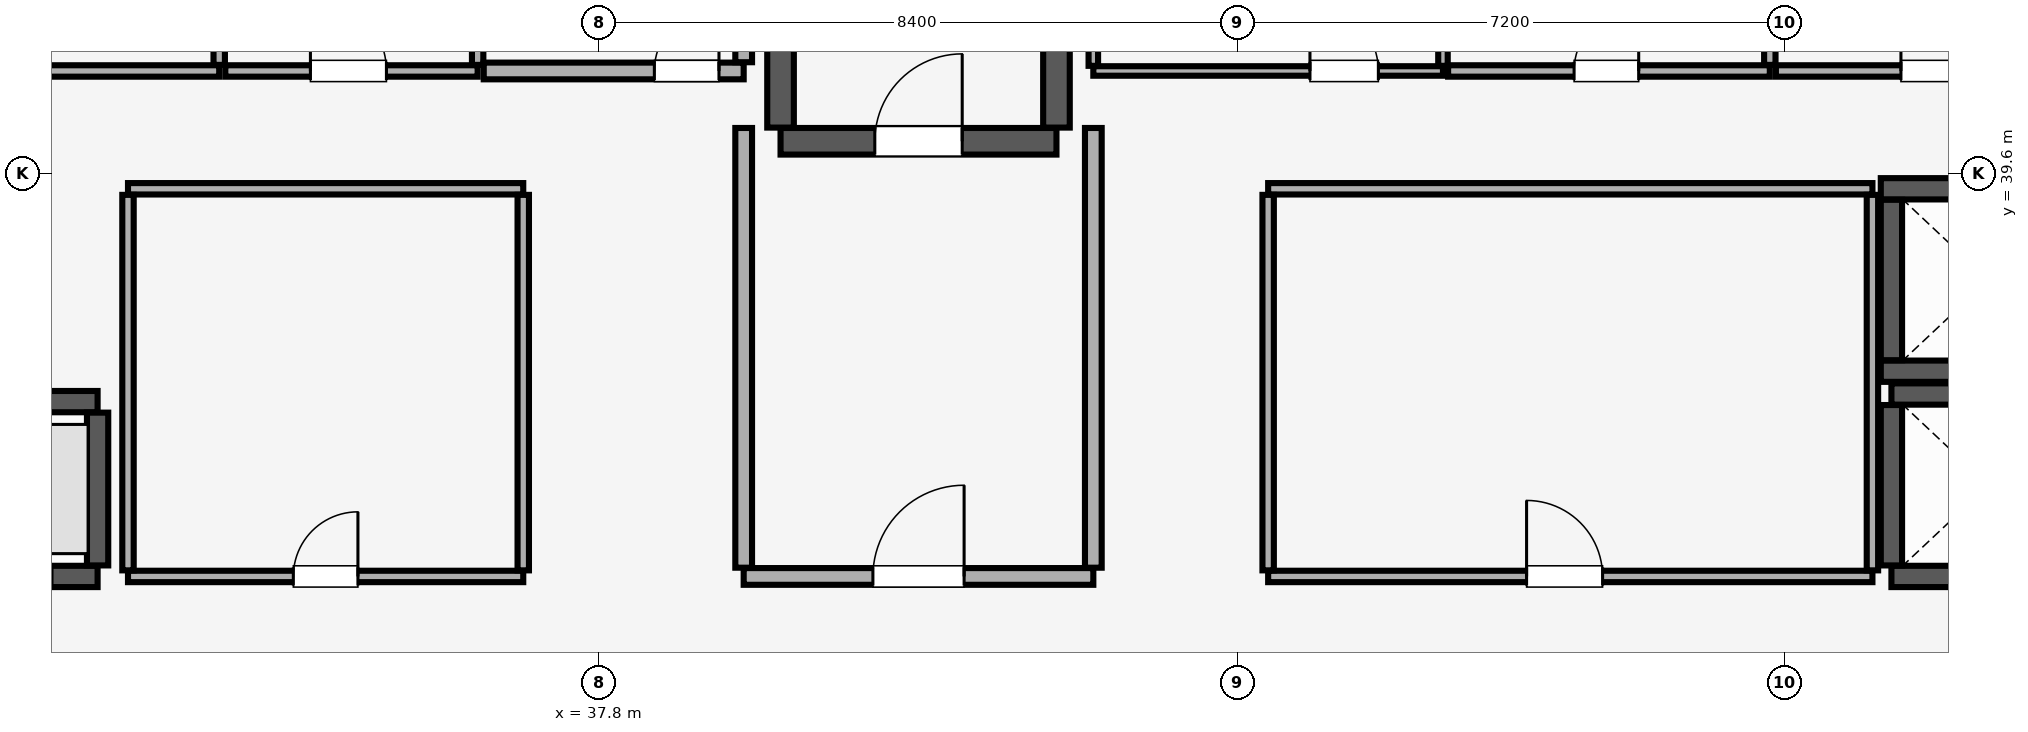
"""IFC4 building model, lengths in metres.
Left out: names, types, materials, properties, quantities, classifications, styles, units other than length and angle.
Written with IfcOpenShell. Run it as: python <this file> out.ifc"""

import sys

from ifc_helpers import new_model, si_unit, direction, frame, frame_2d, origin, place, context, subcontext, project, spatial, rectangle, extrude, element, fill, save


model = new_model("IFC4")
c1 = context("Model", 3, precision=1e-05, world=origin(), true_north=direction((0.0, 1.0)))
c2 = subcontext(c1, "Body", "Model", "MODEL_VIEW")
j1 = project(units=[si_unit("LENGTHUNIT", "METRE"), si_unit("PLANEANGLEUNIT", "RADIAN")], contexts=[c1])
p1 = place(None, origin())
s1 = spatial("IfcSite", under=j1, at=p1, CompositionType="ELEMENT")
p2 = place(p1, origin())
s2 = spatial("IfcBuilding", under=s1, at=p2, CompositionType="ELEMENT")
p3 = place(p2, frame((0.0, 0.0, 290.3)))
s3 = spatial("IfcBuildingStorey", under=s2, at=p3, CompositionType="ELEMENT", Elevation=290.3)
p4 = place(p3, frame((40.185, 40.025, 0.0), z_axis=(0.0, 0.0, 1.0), x_axis=(1.0, 0.0, 0.0)))
e1 = element("IfcWall", 1, at=p4, inside=s3, PredefinedType="SHEAR", context=c2, shape_type="SweptSolid", body=[
    extrude(rectangle(XDim=3.63, YDim=0.35, at=frame_2d((1.815, 0.0))), origin(), (0.0, 0.0, 1.0), 4.02),
])
p5 = place(p4, frame((1.24, 0.0, 0.0)))
e2 = element("IfcOpeningElement", 2, at=p5, cuts=e1, PredefinedType="OPENING", context=c2, shape_type="SweptSolid", body=[
    extrude(rectangle(XDim=1.15, YDim=2.15, at=frame_2d((0.575, 1.075))), frame((0.0, 0.185, 0.0), z_axis=(0.0, -1.0, 0.0), x_axis=(1.0, 0.0, 0.0)), (0.0, 0.0, 1.0), 0.37),
])
for number, where, z_axis, x_axis in (
    (3, (40.185, 40.205, 0.0), (0.0, 0.0, 1.0), (0.0, 1.0, 0.0)),
    (4, (43.815, 40.205, 0.0), (0.0, 0.0, 1.0), (0.0, 1.0, 0.0)),
):
    element("IfcWall", number, at=place(p3, frame(where, z_axis=z_axis, x_axis=x_axis)), inside=s3, PredefinedType="SHEAR", context=c2, shape_type="SweptSolid", body=[
        extrude(rectangle(XDim=8.09, YDim=0.35, at=frame_2d((4.045, 0.0))), origin(), (0.0, 0.0, 1.0), 4.02),
    ])
p6 = place(p3, frame((28.9, 34.3, 0.0), z_axis=(0.0, 0.0, 1.0), x_axis=(1.0, 0.0, 0.0)))
e5 = element("IfcWall", 5, at=p6, inside=s3, PredefinedType="SHEAR", context=c2, shape_type="SweptSolid", body=[
    extrude(rectangle(XDim=2.3, YDim=0.28, at=frame_2d((1.15, 0.0))), origin(), (0.0, 0.0, 1.0), 4.02),
])
p7 = place(p6, frame((0.6, 0.0, 0.0)))
e6 = element("IfcOpeningElement", 6, at=p7, cuts=e5, PredefinedType="OPENING", context=c2, shape_type="SweptSolid", body=[
    extrude(rectangle(XDim=1.1, YDim=2.2, at=frame_2d((0.55, 1.1))), frame((0.0, 0.15, 0.0), z_axis=(0.0, -1.0, 0.0), x_axis=(1.0, 0.0, 0.0)), (0.0, 0.0, 1.0), 0.3),
])
p8 = place(p3, frame((28.9, 36.6, 0.0), z_axis=(0.0, 0.0, 1.0), x_axis=(1.0, 0.0, 0.0)))
e7 = element("IfcWall", 7, at=p8, inside=s3, PredefinedType="SHEAR", context=c2, shape_type="SweptSolid", body=[
    extrude(rectangle(XDim=2.3, YDim=0.28, at=frame_2d((1.15, 0.0))), origin(), (0.0, 0.0, 1.0), 4.02),
])
p9 = place(p3, frame((31.2, 34.445, 0.0), z_axis=(0.0, 0.0, 1.0), x_axis=(0.0, 1.0, 0.0)))
e8 = element("IfcWall", 8, at=p9, inside=s3, PredefinedType="SHEAR", context=c2, shape_type="SweptSolid", body=[
    extrude(rectangle(XDim=2.01, YDim=0.28, at=frame_2d((1.005, 0.0))), origin(), (0.0, 0.0, 1.0), 4.02),
])
for number, where, z_axis, x_axis in (
    (9, (54.8, 34.3, 0.0), (0.0, 0.0, 1.0), (1.0, 0.0, 0.0)),
    (10, (54.8, 36.7, 0.0), (0.0, 0.0, 1.0), (1.0, 0.0, 0.0)),
):
    element("IfcWall", number, at=place(p3, frame(where, z_axis=z_axis, x_axis=x_axis)), inside=s3, PredefinedType="SHEAR", context=c2, shape_type="SweptSolid", body=[
        extrude(rectangle(XDim=2.55, YDim=0.28, at=frame_2d((1.275, 0.0))), origin(), (0.0, 0.0, 1.0), 4.02),
    ])
p10 = place(p3, frame((54.8, 34.445, 0.0), z_axis=(0.0, 0.0, 1.0), x_axis=(0.0, 1.0, 0.0)))
e11 = element("IfcWall", 11, at=p10, inside=s3, PredefinedType="SHEAR", context=c2, shape_type="SweptSolid", body=[
    extrude(rectangle(XDim=2.11, YDim=0.28, at=frame_2d((1.055, 0.0))), origin(), (0.0, 0.0, 1.0), 4.02),
])
for number, where, z_axis, x_axis in (
    (12, (54.66, 37.0, 0.0), (0.0, 0.0, 1.0), (1.0, 0.0, 0.0)),
    (13, (54.66, 39.4, 0.0), (0.0, 0.0, 1.0), (1.0, 0.0, 0.0)),
):
    element("IfcWall", number, at=place(p3, frame(where, z_axis=z_axis, x_axis=x_axis)), inside=s3, PredefinedType="SHEAR", context=c2, shape_type="SweptSolid", body=[
        extrude(rectangle(XDim=2.83, YDim=0.28, at=frame_2d((1.415, 0.0))), origin(), (0.0, 0.0, 1.0), 4.02),
    ])
p11 = place(p3, frame((54.8, 37.145, 0.0), z_axis=(0.0, 0.0, 1.0), x_axis=(0.0, 1.0, 0.0)))
e14 = element("IfcWall", 14, at=p11, inside=s3, PredefinedType="SHEAR", context=c2, shape_type="SweptSolid", body=[
    extrude(rectangle(XDim=2.11, YDim=0.28, at=frame_2d((1.055, 0.0))), origin(), (0.0, 0.0, 1.0), 4.02),
])
p12 = place(p3, frame((39.7, 34.3, 0.0), z_axis=(0.0, 0.0, 1.0), x_axis=(1.0, 0.0, 0.0)))
e15 = element("IfcWall", 15, at=p12, inside=s3, PredefinedType="PARTITIONING", context=c2, shape_type="SweptSolid", body=[
    extrude(rectangle(XDim=4.6, YDim=0.22, at=frame_2d((2.3, 0.0))), origin(), (0.0, 0.0, 1.0), 4.02),
])
p13 = place(p12, frame((1.7, 0.0, 0.0)))
e16 = element("IfcOpeningElement", 16, at=p13, cuts=e15, PredefinedType="OPENING", context=c2, shape_type="SweptSolid", body=[
    extrude(rectangle(XDim=1.2, YDim=2.15, at=frame_2d((0.6, 1.075))), frame((0.0, 0.12, 0.0), z_axis=(0.0, -1.0, 0.0), x_axis=(1.0, 0.0, 0.0)), (0.0, 0.0, 1.0), 0.24),
])
for number, where, z_axis, x_axis in (
    (17, (39.7, 34.415, 0.0), (0.0, 0.0, 1.0), (0.0, 1.0, 0.0)),
    (18, (44.3, 34.415, 0.0), (0.0, 0.0, 1.0), (0.0, 1.0, 0.0)),
):
    element("IfcWall", number, at=place(p3, frame(where, z_axis=z_axis, x_axis=x_axis)), inside=s3, PredefinedType="PARTITIONING", context=c2, shape_type="SweptSolid", body=[
        extrude(rectangle(XDim=5.785, YDim=0.22, at=frame_2d((2.893, 0.0))), origin(), (0.0, 0.0, 1.0), 4.02),
    ])
p14 = place(p3, frame((31.6, 34.3, 0.0), z_axis=(0.0, 0.0, 1.0), x_axis=(1.0, 0.0, 0.0)))
e19 = element("IfcWall", 19, at=p14, inside=s3, PredefinedType="PARTITIONING", context=c2, shape_type="SweptSolid", body=[
    extrude(rectangle(XDim=5.2, YDim=0.15, at=frame_2d((2.6, 0.0))), origin(), (0.0, 0.0, 1.0), 4.02),
])
p15 = place(p14, frame((2.175, 0.0, 0.0)))
e20 = element("IfcOpeningElement", 20, at=p15, cuts=e19, PredefinedType="OPENING", context=c2, shape_type="SweptSolid", body=[
    extrude(rectangle(XDim=0.85, YDim=2.1, at=frame_2d((0.425, 1.05))), frame((0.0, 0.085, 0.0), z_axis=(0.0, -1.0, 0.0), x_axis=(1.0, 0.0, 0.0)), (0.0, 0.0, 1.0), 0.17),
])
p16 = place(p3, frame((31.6, 39.4, 0.0), z_axis=(0.0, 0.0, 1.0), x_axis=(1.0, 0.0, 0.0)))
e21 = element("IfcWall", 21, at=p16, inside=s3, PredefinedType="PARTITIONING", context=c2, shape_type="SweptSolid", body=[
    extrude(rectangle(XDim=5.2, YDim=0.15, at=frame_2d((2.6, 0.0))), origin(), (0.0, 0.0, 1.0), 4.02),
])
for number, where, z_axis, x_axis in (
    (22, (31.6, 34.38, 0.0), (0.0, 0.0, 1.0), (0.0, 1.0, 0.0)),
    (23, (36.8, 34.38, 0.0), (0.0, 0.0, 1.0), (0.0, 1.0, 0.0)),
):
    element("IfcWall", number, at=place(p3, frame(where, z_axis=z_axis, x_axis=x_axis)), inside=s3, PredefinedType="PARTITIONING", context=c2, shape_type="SweptSolid", body=[
        extrude(rectangle(XDim=4.94, YDim=0.15, at=frame_2d((2.47, 0.0))), origin(), (0.0, 0.0, 1.0), 4.02),
    ])
p17 = place(p3, frame((46.6, 34.3, 0.0), z_axis=(0.0, 0.0, 1.0), x_axis=(1.0, 0.0, 0.0)))
e24 = element("IfcWall", 24, at=p17, inside=s3, PredefinedType="PARTITIONING", context=c2, shape_type="SweptSolid", body=[
    extrude(rectangle(XDim=7.95, YDim=0.15, at=frame_2d((3.975, 0.0))), origin(), (0.0, 0.0, 1.0), 4.02),
])
p18 = place(p17, frame((3.4, 0.0, 0.0)))
e25 = element("IfcOpeningElement", 25, at=p18, cuts=e24, PredefinedType="OPENING", context=c2, shape_type="SweptSolid", body=[
    extrude(rectangle(XDim=1.0, YDim=2.15, at=frame_2d((0.5, 1.075))), frame((0.0, 0.085, 0.0), z_axis=(0.0, -1.0, 0.0), x_axis=(1.0, 0.0, 0.0)), (0.0, 0.0, 1.0), 0.17),
])
p19 = place(p3, frame((46.6, 39.4, 0.0), z_axis=(0.0, 0.0, 1.0), x_axis=(1.0, 0.0, 0.0)))
e26 = element("IfcWall", 26, at=p19, inside=s3, PredefinedType="PARTITIONING", context=c2, shape_type="SweptSolid", body=[
    extrude(rectangle(XDim=7.95, YDim=0.15, at=frame_2d((3.975, 0.0))), origin(), (0.0, 0.0, 1.0), 4.02),
])
for number, where, z_axis, x_axis in (
    (27, (46.6, 34.38, 0.0), (0.0, 0.0, 1.0), (0.0, 1.0, 0.0)),
    (28, (54.55, 34.38, 0.0), (0.0, 0.0, 1.0), (0.0, 1.0, 0.0)),
):
    element("IfcWall", number, at=place(p3, frame(where, z_axis=z_axis, x_axis=x_axis)), inside=s3, PredefinedType="PARTITIONING", context=c2, shape_type="SweptSolid", body=[
        extrude(rectangle(XDim=4.94, YDim=0.15, at=frame_2d((2.47, 0.0))), origin(), (0.0, 0.0, 1.0), 4.02),
    ])
p20 = place(p3, frame((25.0, 40.95, 0.0), z_axis=(0.0, 0.0, 1.0), x_axis=(1.0, 0.0, 0.0)))
e29 = element("IfcWall", 29, at=p20, inside=s3, PredefinedType="PARTITIONING", context=c2, shape_type="SweptSolid", body=[
    extrude(rectangle(XDim=7.8, YDim=0.15, at=frame_2d((3.9, 0.0))), origin(), (0.0, 0.0, 1.0), 4.02),
])
p21 = place(p20, frame((3.475, 0.0, 0.0)))
e30 = element("IfcOpeningElement", 30, at=p21, cuts=e29, PredefinedType="OPENING", context=c2, shape_type="SweptSolid", body=[
    extrude(rectangle(XDim=0.85, YDim=2.1, at=frame_2d((0.425, 1.05))), frame((0.0, 0.085, 0.0), z_axis=(0.0, -1.0, 0.0), x_axis=(1.0, 0.0, 0.0)), (0.0, 0.0, 1.0), 0.17),
])
p22 = place(p3, frame((32.8, 41.03, 0.0), z_axis=(0.0, 0.0, 1.0), x_axis=(0.0, 1.0, 0.0)))
e31 = element("IfcWall", 31, at=p22, inside=s3, PredefinedType="PARTITIONING", context=c2, shape_type="SweptSolid", body=[
    extrude(rectangle(XDim=7.82, YDim=0.15, at=frame_2d((3.91, 0.0))), origin(), (0.0, 0.0, 1.0), 4.02),
])
p23 = place(p3, frame((32.88, 40.95, 0.0), z_axis=(0.0, 0.0, 1.0), x_axis=(1.0, 0.0, 0.0)))
e32 = element("IfcWall", 32, at=p23, inside=s3, PredefinedType="PARTITIONING", context=c2, shape_type="SweptSolid", body=[
    extrude(rectangle(XDim=3.32, YDim=0.15, at=frame_2d((1.66, 0.0))), origin(), (0.0, 0.0, 1.0), 4.02),
])
p24 = place(p23, frame((1.12, 0.0, 0.0)))
e33 = element("IfcOpeningElement", 33, at=p24, cuts=e32, PredefinedType="OPENING", context=c2, shape_type="SweptSolid", body=[
    extrude(rectangle(XDim=1.0, YDim=2.15, at=frame_2d((0.5, 1.075))), frame((0.0, 0.085, 0.0), z_axis=(0.0, -1.0, 0.0), x_axis=(1.0, 0.0, 0.0)), (0.0, 0.0, 1.0), 0.17),
])
p25 = place(p3, frame((36.2, 41.03, 0.0), z_axis=(0.0, 0.0, 1.0), x_axis=(0.0, 1.0, 0.0)))
e34 = element("IfcWall", 34, at=p25, inside=s3, PredefinedType="PARTITIONING", context=c2, shape_type="SweptSolid", body=[
    extrude(rectangle(XDim=7.82, YDim=0.15, at=frame_2d((3.91, 0.0))), origin(), (0.0, 0.0, 1.0), 4.02),
])
p26 = place(p3, frame((36.28, 40.95, 0.0), z_axis=(0.0, 0.0, 1.0), x_axis=(1.0, 0.0, 0.0)))
e35 = element("IfcWall", 35, at=p26, inside=s3, PredefinedType="PARTITIONING", context=c2, shape_type="SweptSolid", body=[
    extrude(rectangle(XDim=3.42, YDim=0.22, at=frame_2d((1.71, 0.0))), origin(), (0.0, 0.0, 1.0), 4.02),
])
p27 = place(p26, frame((2.245, 0.0, 0.0)))
e36 = element("IfcOpeningElement", 36, at=p27, cuts=e35, PredefinedType="OPENING", context=c2, shape_type="SweptSolid", body=[
    extrude(rectangle(XDim=0.85, YDim=2.1, at=frame_2d((0.425, 1.05))), frame((0.0, 0.12, 0.0), z_axis=(0.0, -1.0, 0.0), x_axis=(1.0, 0.0, 0.0)), (0.0, 0.0, 1.0), 0.24),
])
p28 = place(p3, frame((39.7, 41.065, 0.0), z_axis=(0.0, 0.0, 1.0), x_axis=(0.0, 1.0, 0.0)))
e37 = element("IfcWall", 37, at=p28, inside=s3, PredefinedType="PARTITIONING", context=c2, shape_type="SweptSolid", body=[
    extrude(rectangle(XDim=7.785, YDim=0.22, at=frame_2d((3.893, 0.0))), origin(), (0.0, 0.0, 1.0), 4.02),
])
p29 = place(p3, frame((44.3, 40.95, 0.0), z_axis=(0.0, 0.0, 1.0), x_axis=(1.0, 0.0, 0.0)))
e38 = element("IfcWall", 38, at=p29, inside=s3, PredefinedType="PARTITIONING", context=c2, shape_type="SweptSolid", body=[
    extrude(rectangle(XDim=4.6, YDim=0.125, at=frame_2d((2.3, 0.0))), origin(), (0.0, 0.0, 1.0), 4.02),
])
p30 = place(p29, frame((2.85, 0.0, 0.0)))
e39 = element("IfcOpeningElement", 39, at=p30, cuts=e38, PredefinedType="OPENING", context=c2, shape_type="SweptSolid", body=[
    extrude(rectangle(XDim=0.9, YDim=2.1, at=frame_2d((0.45, 1.05))), frame((0.0, 0.073, 0.0), z_axis=(0.0, -1.0, 0.0), x_axis=(1.0, 0.0, 0.0)), (0.0, 0.0, 1.0), 0.145),
])
for number, where, z_axis, x_axis in (
    (40, (44.3, 41.018, 0.0), (0.0, 0.0, 1.0), (0.0, 1.0, 0.0)),
    (41, (48.9, 41.018, 0.0), (0.0, 0.0, 1.0), (0.0, 1.0, 0.0)),
):
    element("IfcWall", number, at=place(p3, frame(where, z_axis=z_axis, x_axis=x_axis)), inside=s3, PredefinedType="PARTITIONING", context=c2, shape_type="SweptSolid", body=[
        extrude(rectangle(XDim=3.515, YDim=0.125, at=frame_2d((1.757, 0.0))), origin(), (0.0, 0.0, 1.0), 4.02),
    ])
p31 = place(p3, frame((48.968, 40.95, 0.0), z_axis=(0.0, 0.0, 1.0), x_axis=(1.0, 0.0, 0.0)))
e42 = element("IfcWall", 42, at=p31, inside=s3, PredefinedType="PARTITIONING", context=c2, shape_type="SweptSolid", body=[
    extrude(rectangle(XDim=4.232, YDim=0.15, at=frame_2d((2.116, 0.0))), origin(), (0.0, 0.0, 1.0), 4.02),
])
p32 = place(p31, frame((1.657, 0.0, 0.0)))
e43 = element("IfcOpeningElement", 43, at=p32, cuts=e42, PredefinedType="OPENING", context=c2, shape_type="SweptSolid", body=[
    extrude(rectangle(XDim=0.85, YDim=2.1, at=frame_2d((0.425, 1.05))), frame((0.0, 0.085, 0.0), z_axis=(0.0, -1.0, 0.0), x_axis=(1.0, 0.0, 0.0)), (0.0, 0.0, 1.0), 0.17),
])
p33 = place(p3, frame((53.2, 41.03, 0.0), z_axis=(0.0, 0.0, 1.0), x_axis=(0.0, 1.0, 0.0)))
e44 = element("IfcWall", 44, at=p33, inside=s3, PredefinedType="PARTITIONING", context=c2, shape_type="SweptSolid", body=[
    extrude(rectangle(XDim=7.82, YDim=0.15, at=frame_2d((3.91, 0.0))), origin(), (0.0, 0.0, 1.0), 4.02),
])
p34 = place(p3, frame((53.28, 40.95, 0.0), z_axis=(0.0, 0.0, 1.0), x_axis=(1.0, 0.0, 0.0)))
e45 = element("IfcWall", 45, at=p34, inside=s3, PredefinedType="PARTITIONING", context=c2, shape_type="SweptSolid", body=[
    extrude(rectangle(XDim=4.22, YDim=0.15, at=frame_2d((2.11, 0.0))), origin(), (0.0, 0.0, 1.0), 4.02),
])
p35 = place(p34, frame((1.645, 0.0, 0.0)))
e46 = element("IfcOpeningElement", 46, at=p35, cuts=e45, PredefinedType="OPENING", context=c2, shape_type="SweptSolid", body=[
    extrude(rectangle(XDim=0.85, YDim=2.1, at=frame_2d((0.425, 1.05))), frame((0.0, 0.085, 0.0), z_axis=(0.0, -1.0, 0.0), x_axis=(1.0, 0.0, 0.0)), (0.0, 0.0, 1.0), 0.17),
])
p36 = place(p5, origin())
e47 = element("IfcDoor", 47, at=p36, inside=s3, OperationType="SINGLE_SWING_RIGHT", PredefinedType="DOOR", context=c2, shape_type="SweptSolid", body=[
    extrude(rectangle(XDim=1.15, YDim=2.15, at=frame_2d((0.575, 1.075))), frame((0.0, 0.025, 0.0), z_axis=(0.0, -1.0, 0.0), x_axis=(1.0, 0.0, 0.0)), (0.0, 0.0, 1.0), 0.05),
])
fill(e2, e47)
p37 = place(p13, origin())
e48 = element("IfcDoor", 48, at=p37, inside=s3, OperationType="SINGLE_SWING_RIGHT", PredefinedType="DOOR", context=c2, shape_type="SweptSolid", body=[
    extrude(rectangle(XDim=1.2, YDim=2.15, at=frame_2d((0.6, 1.075))), frame((0.0, 0.025, 0.0), z_axis=(0.0, -1.0, 0.0), x_axis=(1.0, 0.0, 0.0)), (0.0, 0.0, 1.0), 0.05),
])
fill(e16, e48)
p38 = place(p15, origin())
e49 = element("IfcDoor", 49, at=p38, inside=s3, OperationType="SINGLE_SWING_RIGHT", PredefinedType="DOOR", context=c2, shape_type="SweptSolid", body=[
    extrude(rectangle(XDim=0.85, YDim=2.1, at=frame_2d((0.425, 1.05))), frame((0.0, 0.025, 0.0), z_axis=(0.0, -1.0, 0.0), x_axis=(1.0, 0.0, 0.0)), (0.0, 0.0, 1.0), 0.05),
])
fill(e20, e49)
p39 = place(p18, origin())
e50 = element("IfcDoor", 50, at=p39, inside=s3, OperationType="SINGLE_SWING_LEFT", PredefinedType="DOOR", context=c2, shape_type="SweptSolid", body=[
    extrude(rectangle(XDim=1.0, YDim=2.15, at=frame_2d((0.5, 1.075))), frame((0.0, 0.025, 0.0), z_axis=(0.0, -1.0, 0.0), x_axis=(1.0, 0.0, 0.0)), (0.0, 0.0, 1.0), 0.05),
])
fill(e25, e50)
p40 = place(p24, origin())
e51 = element("IfcDoor", 51, at=p40, inside=s3, OperationType="SINGLE_SWING_LEFT", PredefinedType="DOOR", context=c2, shape_type="SweptSolid", body=[
    extrude(rectangle(XDim=1.0, YDim=2.15, at=frame_2d((0.5, 1.075))), frame((0.0, 0.025, 0.0), z_axis=(0.0, -1.0, 0.0), x_axis=(1.0, 0.0, 0.0)), (0.0, 0.0, 1.0), 0.05),
])
fill(e33, e51)
p41 = place(p27, origin())
e52 = element("IfcDoor", 52, at=p41, inside=s3, OperationType="SINGLE_SWING_RIGHT", PredefinedType="DOOR", context=c2, shape_type="SweptSolid", body=[
    extrude(rectangle(XDim=0.85, YDim=2.1, at=frame_2d((0.425, 1.05))), frame((0.0, 0.025, 0.0), z_axis=(0.0, -1.0, 0.0), x_axis=(1.0, 0.0, 0.0)), (0.0, 0.0, 1.0), 0.05),
])
fill(e36, e52)
p42 = place(p30, origin())
e53 = element("IfcDoor", 53, at=p42, inside=s3, OperationType="SINGLE_SWING_LEFT", PredefinedType="DOOR", context=c2, shape_type="SweptSolid", body=[
    extrude(rectangle(XDim=0.9, YDim=2.1, at=frame_2d((0.45, 1.05))), frame((0.0, 0.025, 0.0), z_axis=(0.0, -1.0, 0.0), x_axis=(1.0, 0.0, 0.0)), (0.0, 0.0, 1.0), 0.05),
])
fill(e39, e53)
p43 = place(p32, origin())
e54 = element("IfcDoor", 54, at=p43, inside=s3, OperationType="SINGLE_SWING_RIGHT", PredefinedType="DOOR", context=c2, shape_type="SweptSolid", body=[
    extrude(rectangle(XDim=0.85, YDim=2.1, at=frame_2d((0.425, 1.05))), frame((0.0, 0.025, 0.0), z_axis=(0.0, -1.0, 0.0), x_axis=(1.0, 0.0, 0.0)), (0.0, 0.0, 1.0), 0.05),
])
fill(e43, e54)
p44 = place(p35, origin())
e55 = element("IfcDoor", 55, at=p44, inside=s3, OperationType="SINGLE_SWING_LEFT", PredefinedType="DOOR", context=c2, shape_type="SweptSolid", body=[
    extrude(rectangle(XDim=0.85, YDim=2.1, at=frame_2d((0.425, 1.05))), frame((0.0, 0.025, 0.0), z_axis=(0.0, -1.0, 0.0), x_axis=(1.0, 0.0, 0.0)), (0.0, 0.0, 1.0), 0.05),
])
fill(e46, e55)
save(model, sys.argv[1])
